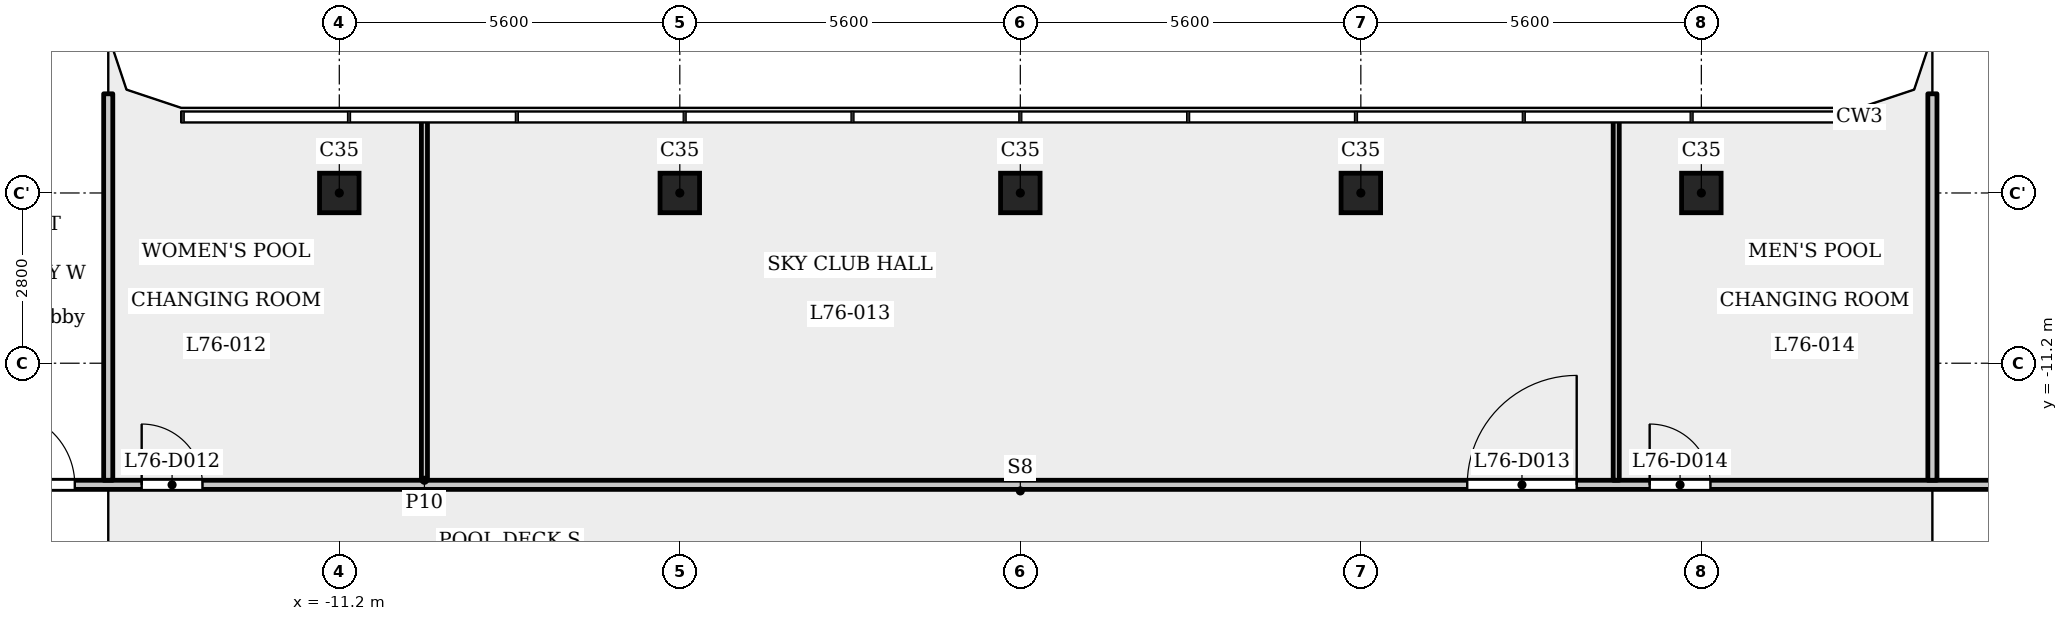
"""IFC4 building model, lengths in metres.
Left out: names, types, materials, properties, quantities, classifications, styles, units other than length and angle.
Written with IfcOpenShell. Run it as: python <this file> out.ifc"""

import sys

from ifc_helpers import new_model, si_unit, direction, frame, frame_2d, origin, origin_2d, place, context, subcontext, project, spatial, polyline, rectangle, outline, extrude, element, fill, save


model = new_model("IFC4")
c1 = context("Model", 3, precision=1e-05, world=origin(), true_north=direction((0.0, 1.0)))
c2 = subcontext(c1, "Body", "Model", "MODEL_VIEW")
j1 = project(units=[si_unit("LENGTHUNIT", "METRE"), si_unit("PLANEANGLEUNIT", "RADIAN")], contexts=[c1])
p1 = place(None, origin())
s1 = spatial("IfcSite", under=j1, at=p1, CompositionType="ELEMENT")
p2 = place(p1, origin())
s2 = spatial("IfcBuilding", under=s1, at=p2, CompositionType="ELEMENT")
p3 = place(p2, frame((0.0, 0.0, 294.5)))
s3 = spatial("IfcBuildingStorey", under=s2, at=p3, CompositionType="ELEMENT", Elevation=294.5)
for number, where, z_axis, x_axis in (
    (1, (-11.2, -8.4, 0.0), (0.0, 0.0, 1.0), (1.0, 0.0, 0.0)),
    (2, (-5.6, -8.4, 0.0), (0.0, 0.0, 1.0), (1.0, 0.0, 0.0)),
    (3, (0.0, -8.4, 0.0), (0.0, 0.0, 1.0), (1.0, 0.0, 0.0)),
    (4, (5.6, -8.4, 0.0), (0.0, 0.0, 1.0), (1.0, 0.0, 0.0)),
    (5, (11.2, -8.4, 0.0), (0.0, 0.0, 1.0), (1.0, 0.0, 0.0)),
):
    element("IfcColumn", number, at=place(p3, frame(where, z_axis=z_axis, x_axis=x_axis)), inside=s3, PredefinedType="COLUMN", context=c2, shape_type="SweptSolid", body=[
        extrude(rectangle(XDim=0.65, YDim=0.65, at=origin_2d()), origin(), (0.0, 0.0, 1.0), 5.4),
    ])
p4 = place(p3, frame((-17.4, -13.2, 0.0), z_axis=(0.0, 0.0, 1.0), x_axis=(1.0, 0.0, 0.0)))
e6 = element("IfcWall", 6, at=p4, inside=s3, PredefinedType="PARTITIONING", context=c2, shape_type="SweptSolid", body=[
    extrude(rectangle(XDim=34.8, YDim=0.15, at=frame_2d((17.4, 0.0))), origin(), (0.0, 0.0, 1.0), 4.6),
])
p5 = place(p4, frame((0.65, 0.0, 0.0)))
e7 = element("IfcOpeningElement", 7, at=p5, cuts=e6, PredefinedType="OPENING", context=c2, shape_type="SweptSolid", body=[
    extrude(rectangle(XDim=1.2, YDim=2.1, at=frame_2d((0.6, 1.05))), frame((0.0, 0.085, 0.0), z_axis=(0.0, -1.0, 0.0), x_axis=(1.0, 0.0, 0.0)), (0.0, 0.0, 1.0), 0.17),
])
p6 = place(p4, frame((2.95, 0.0, 0.0)))
e8 = element("IfcOpeningElement", 8, at=p6, cuts=e6, PredefinedType="OPENING", context=c2, shape_type="SweptSolid", body=[
    extrude(rectangle(XDim=1.0, YDim=2.1, at=frame_2d((0.5, 1.05))), frame((0.0, 0.085, 0.0), z_axis=(0.0, -1.0, 0.0), x_axis=(1.0, 0.0, 0.0)), (0.0, 0.0, 1.0), 0.17),
])
p7 = place(p4, frame((24.75, 0.0, 0.0)))
e9 = element("IfcOpeningElement", 9, at=p7, cuts=e6, PredefinedType="OPENING", context=c2, shape_type="SweptSolid", body=[
    extrude(rectangle(XDim=1.8, YDim=2.1, at=frame_2d((0.9, 1.05))), frame((0.0, 0.085, 0.0), z_axis=(0.0, -1.0, 0.0), x_axis=(1.0, 0.0, 0.0)), (0.0, 0.0, 1.0), 0.17),
])
p8 = place(p4, frame((27.75, 0.0, 0.0)))
e10 = element("IfcOpeningElement", 10, at=p8, cuts=e6, PredefinedType="OPENING", context=c2, shape_type="SweptSolid", body=[
    extrude(rectangle(XDim=1.0, YDim=2.1, at=frame_2d((0.5, 1.05))), frame((0.0, 0.085, 0.0), z_axis=(0.0, -1.0, 0.0), x_axis=(1.0, 0.0, 0.0)), (0.0, 0.0, 1.0), 0.17),
])
p9 = place(p3, frame((-15.0, -13.125, 0.0), z_axis=(0.0, 0.0, 1.0), x_axis=(0.0, 1.0, 0.0)))
e11 = element("IfcWall", 11, at=p9, inside=s3, PredefinedType="PARTITIONING", context=c2, shape_type="SweptSolid", body=[
    extrude(rectangle(XDim=6.356, YDim=0.15, at=frame_2d((3.178, 0.0))), origin(), (0.0, 0.0, 1.0), 4.6),
])
for number, where, z_axis, x_axis in (
    (12, (-9.8, -13.125, 0.0), (0.0, 0.0, 1.0), (0.0, 1.0, 0.0)),
    (13, (9.8, -13.125, 0.0), (0.0, 0.0, 1.0), (0.0, 1.0, 0.0)),
):
    element("IfcWall", number, at=place(p3, frame(where, z_axis=z_axis, x_axis=x_axis)), inside=s3, PredefinedType="PARTITIONING", context=c2, shape_type="SweptSolid", body=[
        extrude(rectangle(XDim=5.943, YDim=0.1, at=frame_2d((2.972, 0.0))), origin(), (0.0, 0.0, 1.0), 4.6),
    ])
p10 = place(p3, frame((15.0, -13.125, 0.0), z_axis=(0.0, 0.0, 1.0), x_axis=(0.0, 1.0, 0.0)))
e14 = element("IfcWall", 14, at=p10, inside=s3, PredefinedType="PARTITIONING", context=c2, shape_type="SweptSolid", body=[
    extrude(rectangle(XDim=6.356, YDim=0.15, at=frame_2d((3.178, 0.0))), origin(), (0.0, 0.0, 1.0), 4.6),
])
p11 = place(p3, origin())
e15 = element("IfcWall", 15, at=p11, inside=s3, PredefinedType="SOLIDWALL", context=c2, shape_type="SweptSolid", body=[
    extrude(outline(polyline([(14.937, -6.937), (15.3, -5.849), (15.3, -5.8), (15.0, -5.8), (14.7, -6.7), (13.8, -7.0), (13.8, -7.3), (13.849, -7.3), (14.937, -6.937)])), origin(), (0.0, 0.0, 1.0), 4.6),
])
e16 = element("IfcWall", 16, at=p11, inside=s3, PredefinedType="SOLIDWALL", context=c2, shape_type="SweptSolid", body=[
    extrude(outline(polyline([(-14.937, -6.937), (-13.849, -7.3), (-13.8, -7.3), (-13.8, -7.0), (-14.7, -6.7), (-15.0, -5.8), (-15.3, -5.8), (-15.3, -5.849), (-14.937, -6.937)])), origin(), (0.0, 0.0, 1.0), 4.6),
])
p12 = place(p5, origin())
e17 = element("IfcDoor", 17, at=p12, inside=s3, OperationType="SINGLE_SWING_RIGHT", PredefinedType="DOOR", context=c2, shape_type="SweptSolid", body=[
    extrude(rectangle(XDim=1.2, YDim=2.1, at=frame_2d((0.6, 1.05))), frame((0.0, 0.025, 0.0), z_axis=(0.0, -1.0, 0.0), x_axis=(1.0, 0.0, 0.0)), (0.0, 0.0, 1.0), 0.05),
])
fill(e7, e17)
p13 = place(p6, origin())
e18 = element("IfcDoor", 18, at=p13, inside=s3, OperationType="SINGLE_SWING_RIGHT", PredefinedType="DOOR", context=c2, shape_type="SweptSolid", body=[
    extrude(rectangle(XDim=1.0, YDim=2.1, at=frame_2d((0.5, 1.05))), frame((0.0, 0.025, 0.0), z_axis=(0.0, -1.0, 0.0), x_axis=(1.0, 0.0, 0.0)), (0.0, 0.0, 1.0), 0.05),
])
fill(e8, e18)
p14 = place(p7, origin())
e19 = element("IfcDoor", 19, at=p14, inside=s3, OperationType="SINGLE_SWING_LEFT", PredefinedType="DOOR", context=c2, shape_type="SweptSolid", body=[
    extrude(rectangle(XDim=1.8, YDim=2.1, at=frame_2d((0.9, 1.05))), frame((0.0, 0.025, 0.0), z_axis=(0.0, -1.0, 0.0), x_axis=(1.0, 0.0, 0.0)), (0.0, 0.0, 1.0), 0.05),
])
fill(e9, e19)
p15 = place(p8, origin())
e20 = element("IfcDoor", 20, at=p15, inside=s3, OperationType="SINGLE_SWING_RIGHT", PredefinedType="DOOR", context=c2, shape_type="SweptSolid", body=[
    extrude(rectangle(XDim=1.0, YDim=2.1, at=frame_2d((0.5, 1.05))), frame((0.0, 0.025, 0.0), z_axis=(0.0, -1.0, 0.0), x_axis=(1.0, 0.0, 0.0)), (0.0, 0.0, 1.0), 0.05),
])
fill(e10, e20)
save(model, sys.argv[1])
